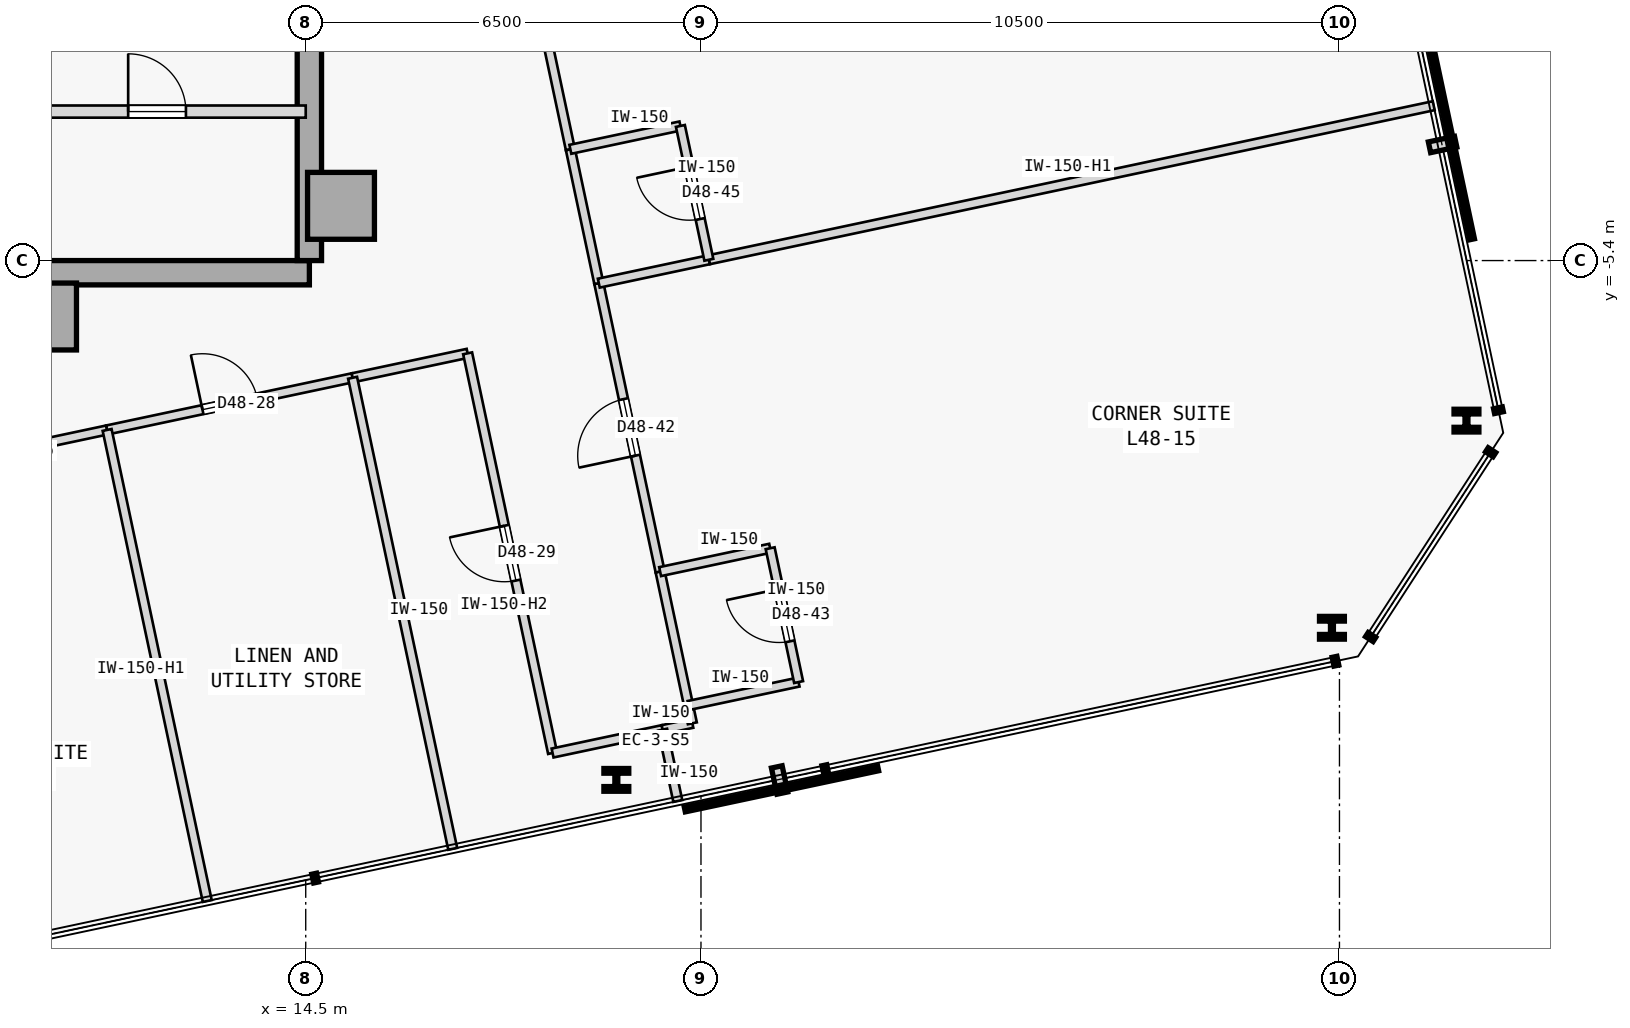
"""IFC4 building model, lengths in metres.
Left out: names, types, materials, properties, quantities, classifications, styles, units other than length and angle.
Written with IfcOpenShell. Run it as: python <this file> out.ifc"""

import sys

from ifc_helpers import new_model, si_unit, direction, frame, frame_2d, origin, origin_2d, place, context, subcontext, project, spatial, rectangle, i_section, extrude, element, fill, save


model = new_model("IFC4")
c1 = context("Model", 3, precision=1e-05, world=origin(), true_north=direction((0.0, 1.0)))
c2 = subcontext(c1, "Body", "Model", "MODEL_VIEW")
j1 = project(units=[si_unit("LENGTHUNIT", "METRE"), si_unit("PLANEANGLEUNIT", "RADIAN")], contexts=[c1])
p1 = place(None, origin())
s1 = spatial("IfcSite", under=j1, at=p1, CompositionType="ELEMENT")
p2 = place(p1, origin())
s2 = spatial("IfcBuilding", under=s1, at=p2, CompositionType="ELEMENT")
p3 = place(p2, frame((0.0, 0.0, 185.4)))
s3 = spatial("IfcBuildingStorey", under=s2, at=p3, CompositionType="ELEMENT", Elevation=185.4)
for number, where, z_axis, x_axis in (
    (1, (15.08, -4.5, 0.0), (0.0, 0.0, 1.0), (1.0, 0.0, 0.0)),
    (2, (10.18, -6.32, 0.0), (0.0, 0.0, 1.0), (1.0, 0.0, 0.0)),
):
    element("IfcColumn", number, at=place(p3, frame(where, z_axis=z_axis, x_axis=x_axis)), inside=s3, PredefinedType="COLUMN", context=c2, shape_type="SweptSolid", body=[
        extrude(rectangle(XDim=1.1, YDim=1.1, at=origin_2d()), origin(), (0.0, 0.0, 1.0), 3.4),
    ])
p4 = place(p3, frame((3.7, -5.6, 0.0), z_axis=(0.0, 0.0, 1.0), x_axis=(1.0, 0.0, 0.0)))
e3 = element("IfcWall", 3, at=p4, inside=s3, PredefinedType="SHEAR", context=c2, shape_type="SweptSolid", body=[
    extrude(rectangle(XDim=10.86, YDim=0.4, at=frame_2d((5.43, 0.0))), origin(), (0.0, 0.0, 1.0), 3.175),
])
p5 = place(p3, frame((14.56, -5.4, 0.0), z_axis=(0.0, 0.0, 1.0), x_axis=(0.0, 1.0, 0.0)))
e4 = element("IfcWall", 4, at=p5, inside=s3, PredefinedType="SHEAR", context=c2, shape_type="SweptSolid", body=[
    extrude(rectangle(XDim=10.8, YDim=0.4, at=frame_2d((5.4, 0.0))), origin(), (0.0, 0.0, 1.0), 3.175),
])
for number, where, z_axis, x_axis in (
    (5, (19.608, -13.94, 0.0), (0.0, 0.0, 1.0), (1.0, 0.0, 0.0)),
    (6, (31.376, -11.439, 0.0), (0.0, 0.0, 1.0), (1.0, 0.0, 0.0)),
    (7, (33.589, -8.032, 0.0), (0.0, 0.0, 1.0), (1.0, 0.0, 0.0)),
):
    element("IfcColumn", number, at=place(p3, frame(where, z_axis=z_axis, x_axis=x_axis)), inside=s3, PredefinedType="COLUMN", context=c2, shape_type="SweptSolid", body=[
        extrude(i_section(OverallWidth=0.409, OverallDepth=0.374, WebThickness=0.048, FlangeThickness=0.077, FilletRadius=0.015, at=origin_2d()), origin(), (0.0, 0.0, 1.0), 3.4),
    ])
p6 = place(p3, frame((3.7, -2.95, 0.0), z_axis=(0.0, 0.0, 1.0), x_axis=(1.0, 0.0, 0.0)))
e8 = element("IfcWall", 8, at=p6, inside=s3, PredefinedType="STANDARD", context=c2, shape_type="SweptSolid", body=[
    extrude(rectangle(XDim=10.8, YDim=0.2, at=frame_2d((5.4, 0.0))), origin(), (0.0, 0.0, 1.0), 3.175),
])
p7 = place(p6, frame((2.69, 0.0, 0.0)))
e9 = element("IfcOpeningElement", 9, at=p7, cuts=e8, PredefinedType="OPENING", context=c2, shape_type="SweptSolid", body=[
    extrude(rectangle(XDim=1.1, YDim=2.15, at=frame_2d((0.55, 1.075))), frame((0.0, 0.11, 0.0), z_axis=(0.0, -1.0, 0.0), x_axis=(1.0, 0.0, 0.0)), (0.0, 0.0, 1.0), 0.22),
])
p8 = place(p6, frame((4.85, 0.0, 0.0)))
e10 = element("IfcOpeningElement", 10, at=p8, cuts=e8, PredefinedType="OPENING", context=c2, shape_type="SweptSolid", body=[
    extrude(rectangle(XDim=1.1, YDim=2.15, at=frame_2d((0.55, 1.075))), frame((0.0, 0.11, 0.0), z_axis=(0.0, -1.0, 0.0), x_axis=(1.0, 0.0, 0.0)), (0.0, 0.0, 1.0), 0.22),
])
p9 = place(p6, frame((7.88, 0.0, 0.0)))
e11 = element("IfcOpeningElement", 11, at=p9, cuts=e8, PredefinedType="OPENING", context=c2, shape_type="SweptSolid", body=[
    extrude(rectangle(XDim=0.95, YDim=2.15, at=frame_2d((0.475, 1.075))), frame((0.0, 0.11, 0.0), z_axis=(0.0, -1.0, 0.0), x_axis=(1.0, 0.0, 0.0)), (0.0, 0.0, 1.0), 0.22),
])
p10 = place(p3, frame((8.004, -8.872, 0.0), z_axis=(0.0, 0.0, 1.0), x_axis=(0.97814625873, 0.20791800435, 0.0)))
e12 = element("IfcWall", 12, at=p10, inside=s3, PredefinedType="PARTITIONING", context=c2, shape_type="SweptSolid", body=[
    extrude(rectangle(XDim=3.302, YDim=0.15, at=frame_2d((1.651, 0.0))), origin(), (0.0, 0.0, 1.0), 3.175),
])
p11 = place(p10, frame((1.191, 0.0, 0.0)))
e13 = element("IfcOpeningElement", 13, at=p11, cuts=e12, PredefinedType="OPENING", context=c2, shape_type="SweptSolid", body=[
    extrude(rectangle(XDim=0.92, YDim=2.15, at=frame_2d((0.46, 1.075))), frame((0.0, 0.085, 0.0), z_axis=(0.0, -1.0, 0.0), x_axis=(1.0, 0.0, 0.0)), (0.0, 0.0, 1.0), 0.17),
])
p12 = place(p3, frame((11.234, -8.185, 0.0), z_axis=(0.0, 0.0, 1.0), x_axis=(0.978155092113, 0.207876443525, 0.0)))
e14 = element("IfcWall", 14, at=p12, inside=s3, PredefinedType="PARTITIONING", context=c2, shape_type="SweptSolid", body=[
    extrude(rectangle(XDim=4.127, YDim=0.15, at=frame_2d((2.063, 0.0))), origin(), (0.0, 0.0, 1.0), 3.175),
])
p13 = place(p12, frame((1.604, 0.0, 0.0)))
e15 = element("IfcOpeningElement", 15, at=p13, cuts=e14, PredefinedType="OPENING", context=c2, shape_type="SweptSolid", body=[
    extrude(rectangle(XDim=0.92, YDim=2.15, at=frame_2d((0.46, 1.075))), frame((0.0, 0.085, 0.0), z_axis=(0.0, -1.0, 0.0), x_axis=(1.0, 0.0, 0.0)), (0.0, 0.0, 1.0), 0.17),
])
p14 = place(p3, frame((15.271, -7.327, 0.0), z_axis=(0.0, 0.0, 1.0), x_axis=(0.978150188204, 0.207899517354, 0.0)))
e16 = element("IfcWall", 16, at=p14, inside=s3, PredefinedType="PARTITIONING", context=c2, shape_type="SweptSolid", body=[
    extrude(rectangle(XDim=1.934, YDim=0.15, at=frame_2d((0.967, 0.0))), origin(), (0.0, 0.0, 1.0), 3.175),
])
p15 = place(p3, frame((18.56, -13.498, 0.0), z_axis=(0.0, 0.0, 1.0), x_axis=(-0.207888737749, 0.978152479278, 0.0)))
e17 = element("IfcWall", 17, at=p15, inside=s3, PredefinedType="PARTITIONING", context=c2, shape_type="SweptSolid", body=[
    extrude(rectangle(XDim=6.72, YDim=0.15, at=frame_2d((3.36, 0.0))), origin(), (0.0, 0.0, 1.0), 2.575),
])
p16 = place(p15, frame((2.9, 0.0, 0.0)))
e18 = element("IfcOpeningElement", 18, at=p16, cuts=e17, PredefinedType="OPENING", context=c2, shape_type="SweptSolid", body=[
    extrude(rectangle(XDim=0.92, YDim=2.15, at=frame_2d((0.46, 1.075))), frame((0.0, 0.085, 0.0), z_axis=(0.0, -1.0, 0.0), x_axis=(1.0, 0.0, 0.0)), (0.0, 0.0, 1.0), 0.17),
])
p17 = place(p3, frame((18.56, -13.498, 0.0), z_axis=(0.0, 0.0, 1.0), x_axis=(0.978160192495, 0.207852442415, 0.0)))
e19 = element("IfcWall", 19, at=p17, inside=s3, PredefinedType="PARTITIONING", context=c2, shape_type="SweptSolid", body=[
    extrude(rectangle(XDim=1.85, YDim=0.15, at=frame_2d((0.925, 0.0))), origin(), (0.0, 0.0, 1.0), 3.175),
])
p18 = place(p3, frame((20.369, -13.114, 0.0), z_axis=(0.0, 0.0, 1.0), x_axis=(0.978143962546, 0.207928806409, 0.0)))
e20 = element("IfcWall", 20, at=p18, inside=s3, PredefinedType="PARTITIONING", context=c2, shape_type="SweptSolid", body=[
    extrude(rectangle(XDim=0.5, YDim=0.15, at=frame_2d((0.25, 0.0))), origin(), (0.0, 0.0, 1.0), 3.175),
])
p19 = place(p3, frame((20.858, -13.01, 0.0), z_axis=(0.0, 0.0, 1.0), x_axis=(-0.208306395052, 0.978063620518, 0.0)))
e21 = element("IfcWall", 21, at=p19, inside=s3, PredefinedType="PARTITIONING", context=c2, shape_type="SweptSolid", body=[
    extrude(rectangle(XDim=0.3, YDim=0.15, at=frame_2d((0.15, 0.0))), origin(), (0.0, 0.0, 1.0), 3.175),
])
p20 = place(p3, frame((20.328, -10.515, 0.0), z_axis=(0.0, 0.0, 1.0), x_axis=(-0.207950868925, 0.97813927235, 0.0)))
e22 = element("IfcWall", 22, at=p20, inside=s3, PredefinedType="PARTITIONING", context=c2, shape_type="SweptSolid", body=[
    extrude(rectangle(XDim=4.85, YDim=0.15, at=frame_2d((2.425, 0.0))), origin(), (0.0, 0.0, 1.0), 3.175),
])
p21 = place(p20, frame((1.95, 0.0, 0.0)))
e23 = element("IfcOpeningElement", 23, at=p21, cuts=e22, PredefinedType="OPENING", context=c2, shape_type="SweptSolid", body=[
    extrude(rectangle(XDim=0.95, YDim=2.15, at=frame_2d((0.475, 1.075))), frame((0.0, 0.085, 0.0), z_axis=(0.0, -1.0, 0.0), x_axis=(1.0, 0.0, 0.0)), (0.0, 0.0, 1.0), 0.17),
])
p22 = place(p3, frame((20.796, -12.716, 0.0), z_axis=(0.0, 0.0, 1.0), x_axis=(-0.207891197838, 0.978151956427, 0.0)))
e24 = element("IfcWall", 24, at=p22, inside=s3, PredefinedType="PARTITIONING", context=c2, shape_type="SweptSolid", body=[
    extrude(rectangle(XDim=2.25, YDim=0.15, at=frame_2d((1.125, 0.0))), origin(), (0.0, 0.0, 1.0), 3.175),
])
p23 = place(p3, frame((18.852, -3.571, 0.0), z_axis=(0.0, 0.0, 1.0), x_axis=(-0.207879907349, 0.978154355979, 0.0)))
e25 = element("IfcWall", 25, at=p23, inside=s3, PredefinedType="PARTITIONING", context=c2, shape_type="SweptSolid", body=[
    extrude(rectangle(XDim=6.35, YDim=0.15, at=frame_2d((3.175, 0.0))), origin(), (0.0, 0.0, 1.0), 3.175),
])
p24 = place(p23, frame((2.7, 0.0, 0.0)))
e26 = element("IfcOpeningElement", 26, at=p24, cuts=e25, PredefinedType="OPENING", context=c2, shape_type="SweptSolid", body=[
    extrude(rectangle(XDim=0.95, YDim=2.15, at=frame_2d((0.475, 1.075))), frame((0.0, 0.085, 0.0), z_axis=(0.0, -1.0, 0.0), x_axis=(1.0, 0.0, 0.0)), (0.0, 0.0, 1.0), 0.17),
])
p25 = place(p3, frame((19.32, -5.771, 0.0), z_axis=(0.0, 0.0, 1.0), x_axis=(-0.207913264065, 0.978147266328, 0.0)))
e27 = element("IfcWall", 27, at=p25, inside=s3, PredefinedType="PARTITIONING", context=c2, shape_type="SweptSolid", body=[
    extrude(rectangle(XDim=2.25, YDim=0.15, at=frame_2d((1.125, 0.0))), origin(), (0.0, 0.0, 1.0), 3.175),
])
p26 = place(p3, frame((12.881, -15.932, 0.0), z_axis=(0.0, 0.0, 1.0), x_axis=(-0.207916267651, 0.978146627887, 0.0)))
e28 = element("IfcWall", 28, at=p26, inside=s3, PredefinedType="PARTITIONING", context=c2, shape_type="SweptSolid", body=[
    extrude(rectangle(XDim=7.92, YDim=0.15, at=frame_2d((3.96, 0.0))), origin(), (0.0, 0.0, 1.0), 2.725),
])
p27 = place(p3, frame((16.917, -15.074, 0.0), z_axis=(0.0, 0.0, 1.0), x_axis=(-0.207922536845, 0.978145295277, 0.0)))
e29 = element("IfcWall", 29, at=p27, inside=s3, PredefinedType="PARTITIONING", context=c2, shape_type="SweptSolid", body=[
    extrude(rectangle(XDim=7.92, YDim=0.15, at=frame_2d((3.96, 0.0))), origin(), (0.0, 0.0, 1.0), 3.175),
])
p28 = place(p3, frame((20.619, -14.288, 0.0), z_axis=(0.0, 0.0, 1.0), x_axis=(-0.207917150959, 0.978146440129, 0.0)))
e30 = element("IfcWall", 30, at=p28, inside=s3, PredefinedType="PARTITIONING", context=c2, shape_type="SweptSolid", body=[
    extrude(rectangle(XDim=1.2, YDim=0.15, at=frame_2d((0.6, 0.0))), origin(), (0.0, 0.0, 1.0), 3.175),
])
for number, where, z_axis, x_axis in (
    (31, (20.796, -12.716, 0.0), (0.0, 0.0, 1.0), (0.978, 0.208, 0.0)),
    (32, (20.328, -10.515, 0.0), (0.0, 0.0, 1.0), (0.978, 0.208, 0.0)),
):
    element("IfcWall", number, at=place(p3, frame(where, z_axis=z_axis, x_axis=x_axis)), inside=s3, PredefinedType="PARTITIONING", context=c2, shape_type="SweptSolid", body=[
        extrude(rectangle(XDim=1.85, YDim=0.15, at=frame_2d((0.925, 0.0))), origin(), (0.0, 0.0, 1.0), 3.175),
    ])
p29 = place(p3, frame((22.605, -12.332, 0.0), z_axis=(0.0, 0.0, 1.0), x_axis=(-0.207891197838, 0.978151956427, 0.0)))
e33 = element("IfcWall", 33, at=p29, inside=s3, PredefinedType="PARTITIONING", context=c2, shape_type="SweptSolid", body=[
    extrude(rectangle(XDim=2.25, YDim=0.15, at=frame_2d((1.125, 0.0))), origin(), (0.0, 0.0, 1.0), 3.175),
])
p30 = place(p29, frame((0.685, 0.0, 0.0)))
e34 = element("IfcOpeningElement", 34, at=p30, cuts=e33, PredefinedType="OPENING", context=c2, shape_type="SweptSolid", body=[
    extrude(rectangle(XDim=0.88, YDim=2.15, at=frame_2d((0.44, 1.075))), frame((0.0, 0.085, 0.0), z_axis=(0.0, -1.0, 0.0), x_axis=(1.0, 0.0, 0.0)), (0.0, 0.0, 1.0), 0.17),
])
p31 = place(p3, frame((21.129, -5.387, 0.0), z_axis=(0.0, 0.0, 1.0), x_axis=(0.97814556055, 0.207921288896, 0.0)))
e35 = element("IfcWall", 35, at=p31, inside=s3, PredefinedType="PARTITIONING", context=c2, shape_type="SweptSolid", body=[
    extrude(rectangle(XDim=12.187, YDim=0.15, at=frame_2d((6.094, 0.0))), origin(), (0.0, 0.0, 1.0), 2.725),
])
p32 = place(p3, frame((19.32, -5.771, 0.0), z_axis=(0.0, 0.0, 1.0), x_axis=(0.978165892835, 0.207825614625, 0.0)))
e36 = element("IfcWall", 36, at=p32, inside=s3, PredefinedType="PARTITIONING", context=c2, shape_type="SweptSolid", body=[
    extrude(rectangle(XDim=1.85, YDim=0.15, at=frame_2d((0.925, 0.0))), origin(), (0.0, 0.0, 1.0), 3.175),
])
p33 = place(p3, frame((18.852, -3.571, 0.0), z_axis=(0.0, 0.0, 1.0), x_axis=(0.978139061018, 0.207951862966, 0.0)))
e37 = element("IfcWall", 37, at=p33, inside=s3, PredefinedType="PARTITIONING", context=c2, shape_type="SweptSolid", body=[
    extrude(rectangle(XDim=1.85, YDim=0.15, at=frame_2d((0.925, 0.0))), origin(), (0.0, 0.0, 1.0), 3.175),
])
p34 = place(p3, frame((21.129, -5.387, 0.0), z_axis=(0.0, 0.0, 1.0), x_axis=(-0.207891197838, 0.978151956427, 0.0)))
e38 = element("IfcWall", 38, at=p34, inside=s3, PredefinedType="PARTITIONING", context=c2, shape_type="SweptSolid", body=[
    extrude(rectangle(XDim=2.25, YDim=0.15, at=frame_2d((1.125, 0.0))), origin(), (0.0, 0.0, 1.0), 3.175),
])
p35 = place(p34, frame((0.685, 0.0, 0.0)))
e39 = element("IfcOpeningElement", 39, at=p35, cuts=e38, PredefinedType="OPENING", context=c2, shape_type="SweptSolid", body=[
    extrude(rectangle(XDim=0.88, YDim=2.15, at=frame_2d((0.44, 1.075))), frame((0.0, 0.085, 0.0), z_axis=(0.0, -1.0, 0.0), x_axis=(1.0, 0.0, 0.0)), (0.0, 0.0, 1.0), 0.17),
])
p36 = place(p9, origin())
e40 = element("IfcDoor", 40, at=p36, inside=s3, OperationType="SINGLE_SWING_LEFT", PredefinedType="DOOR", context=c2, shape_type="SweptSolid", body=[
    extrude(rectangle(XDim=0.95, YDim=2.15, at=frame_2d((0.475, 1.075))), frame((0.0, 0.025, 0.0), z_axis=(0.0, -1.0, 0.0), x_axis=(1.0, 0.0, 0.0)), (0.0, 0.0, 1.0), 0.05),
])
fill(e11, e40)
p37 = place(p13, origin())
e41 = element("IfcDoor", 41, at=p37, inside=s3, OperationType="SINGLE_SWING_LEFT", PredefinedType="DOOR", context=c2, shape_type="SweptSolid", body=[
    extrude(rectangle(XDim=0.92, YDim=2.15, at=frame_2d((0.46, 1.075))), frame((0.0, 0.025, 0.0), z_axis=(0.0, -1.0, 0.0), x_axis=(1.0, 0.0, 0.0)), (0.0, 0.0, 1.0), 0.05),
])
fill(e15, e41)
p38 = place(p16, origin())
e42 = element("IfcDoor", 42, at=p38, inside=s3, OperationType="SINGLE_SWING_RIGHT", PredefinedType="DOOR", context=c2, shape_type="SweptSolid", body=[
    extrude(rectangle(XDim=0.92, YDim=2.15, at=frame_2d((0.46, 1.075))), frame((0.0, 0.025, 0.0), z_axis=(0.0, -1.0, 0.0), x_axis=(1.0, 0.0, 0.0)), (0.0, 0.0, 1.0), 0.05),
])
fill(e18, e42)
p39 = place(p21, origin())
e43 = element("IfcDoor", 43, at=p39, inside=s3, OperationType="SINGLE_SWING_LEFT", PredefinedType="DOOR", context=c2, shape_type="SweptSolid", body=[
    extrude(rectangle(XDim=0.95, YDim=2.15, at=frame_2d((0.475, 1.075))), frame((0.0, 0.025, 0.0), z_axis=(0.0, -1.0, 0.0), x_axis=(1.0, 0.0, 0.0)), (0.0, 0.0, 1.0), 0.05),
])
fill(e23, e43)
p40 = place(p30, origin())
e44 = element("IfcDoor", 44, at=p40, inside=s3, OperationType="SINGLE_SWING_RIGHT", PredefinedType="DOOR", context=c2, shape_type="SweptSolid", body=[
    extrude(rectangle(XDim=0.88, YDim=2.15, at=frame_2d((0.44, 1.075))), frame((0.0, 0.025, 0.0), z_axis=(0.0, -1.0, 0.0), x_axis=(1.0, 0.0, 0.0)), (0.0, 0.0, 1.0), 0.05),
])
fill(e34, e44)
p41 = place(p35, origin())
e45 = element("IfcDoor", 45, at=p41, inside=s3, OperationType="SINGLE_SWING_RIGHT", PredefinedType="DOOR", context=c2, shape_type="SweptSolid", body=[
    extrude(rectangle(XDim=0.88, YDim=2.15, at=frame_2d((0.44, 1.075))), frame((0.0, 0.025, 0.0), z_axis=(0.0, -1.0, 0.0), x_axis=(1.0, 0.0, 0.0)), (0.0, 0.0, 1.0), 0.05),
])
fill(e39, e45)
save(model, sys.argv[1])
